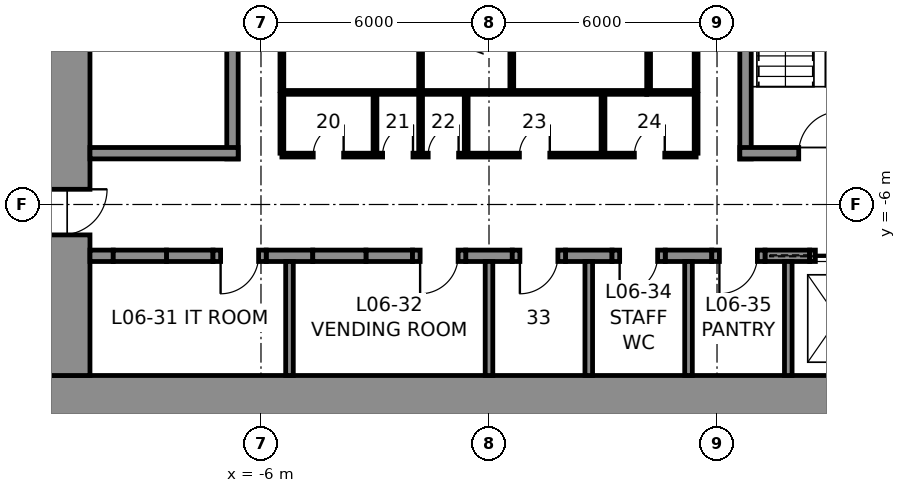
"""IFC4 building model, lengths in metres.
Left out: names, types, materials, properties, quantities, classifications, styles, units other than length and angle.
Written with IfcOpenShell. Run it as: python <this file> out.ifc"""

import sys

from ifc_helpers import new_model, si_unit, direction, frame, frame_2d, origin, place, context, subcontext, project, spatial, rectangle, extrude, element, fill, save


model = new_model("IFC4")
c1 = context("Model", 3, precision=1e-05, world=origin(), true_north=direction((0.0, 1.0)))
c2 = subcontext(c1, "Body", "Model", "MODEL_VIEW")
j1 = project(units=[si_unit("LENGTHUNIT", "METRE"), si_unit("PLANEANGLEUNIT", "RADIAN")], contexts=[c1])
p1 = place(None, origin())
s1 = spatial("IfcSite", under=j1, at=p1, CompositionType="ELEMENT")
p2 = place(p1, origin())
s2 = spatial("IfcBuilding", under=s1, at=p2, CompositionType="ELEMENT")
p3 = place(p2, frame((0.0, 0.0, 32.0)))
s3 = spatial("IfcBuildingStorey", under=s2, at=p3, CompositionType="ELEMENT", Elevation=32.0)
p4 = place(p3, frame((12.0, -11.25, 0.0), z_axis=(0.0, 0.0, 1.0), x_axis=(-1.0, 0.0, 0.0)))
e1 = element("IfcWall", 1, at=p4, inside=s3, PredefinedType="SHEAR", context=c2, shape_type="SweptSolid", body=[
    extrude(rectangle(XDim=24.0, YDim=1.5, at=frame_2d((12.0, 0.0))), origin(), (0.0, 0.0, 1.0), 5.5),
])
p5 = place(p3, frame((-11.25, -10.5, 0.0), z_axis=(0.0, 0.0, 1.0), x_axis=(0.0, 1.0, 0.0)))
e2 = element("IfcWall", 2, at=p5, inside=s3, PredefinedType="SHEAR", context=c2, shape_type="SweptSolid", body=[
    extrude(rectangle(XDim=21.0, YDim=1.5, at=frame_2d((10.5, 0.0))), origin(), (0.0, 0.0, 1.0), 5.5),
])
p6 = place(p5, frame((16.1, 0.0, 0.0)))
e3 = element("IfcOpeningElement", 3, at=p6, cuts=e2, PredefinedType="OPENING", context=c2, shape_type="SweptSolid", body=[
    extrude(rectangle(XDim=1.2, YDim=2.3, at=frame_2d((0.6, 1.15))), frame((0.0, 0.76, 0.0), z_axis=(0.0, -1.0, 0.0), x_axis=(1.0, 0.0, 0.0)), (0.0, 0.0, 1.0), 1.52),
])
p7 = place(p5, frame((3.7, 0.0, 0.0)))
e4 = element("IfcOpeningElement", 4, at=p7, cuts=e2, PredefinedType="OPENING", context=c2, shape_type="SweptSolid", body=[
    extrude(rectangle(XDim=1.2, YDim=2.3, at=frame_2d((0.6, 1.15))), frame((0.0, 0.76, 0.0), z_axis=(0.0, -1.0, 0.0), x_axis=(1.0, 0.0, 0.0)), (0.0, 0.0, 1.0), 1.52),
])
p8 = place(p3, frame((-10.5, -7.35, 0.0), z_axis=(0.0, 0.0, 1.0), x_axis=(1.0, 0.0, 0.0)))
e5 = element("IfcWall", 5, at=p8, inside=s3, PredefinedType="SHEAR", context=c2, shape_type="SweptSolid", body=[
    extrude(rectangle(XDim=0.613, YDim=0.3, at=frame_2d((0.306, 0.0))), origin(), (0.0, 0.0, 1.0), 5.5),
])
for number, where, z_axis, x_axis in (
    (6, (-8.488, -7.35, 0.0), (0.0, 0.0, 1.0), (1.0, 0.0, 0.0)),
    (7, (-5.863, -7.35, 0.0), (0.0, 0.0, 1.0), (1.0, 0.0, 0.0)),
    (8, (-3.238, -7.35, 0.0), (0.0, 0.0, 1.0), (1.0, 0.0, 0.0)),
    (9, (-0.613, -7.35, 0.0), (0.0, 0.0, 1.0), (1.0, 0.0, 0.0)),
    (10, (2.012, -7.35, 0.0), (0.0, 0.0, 1.0), (1.0, 0.0, 0.0)),
    (11, (4.637, -7.35, 0.0), (0.0, 0.0, 1.0), (1.0, 0.0, 0.0)),
):
    element("IfcWall", number, at=place(p3, frame(where, z_axis=z_axis, x_axis=x_axis)), inside=s3, PredefinedType="SHEAR", context=c2, shape_type="SweptSolid", body=[
        extrude(rectangle(XDim=1.225, YDim=0.3, at=frame_2d((0.613, 0.0))), origin(), (0.0, 0.0, 1.0), 5.5),
    ])
p9 = place(p3, frame((7.262, -7.35, 0.0), z_axis=(0.0, 0.0, 1.0), x_axis=(1.0, 0.0, 0.0)))
e12 = element("IfcWall", 12, at=p9, inside=s3, PredefinedType="SHEAR", context=c2, shape_type="SweptSolid", body=[
    extrude(rectangle(XDim=1.175, YDim=0.3, at=frame_2d((0.587, 0.0))), origin(), (0.0, 0.0, 1.0), 5.5),
])
p10 = place(p3, frame((-9.887, -7.35, 0.0), z_axis=(0.0, 0.0, 1.0), x_axis=(1.0, 0.0, 0.0)))
e13 = element("IfcWall", 13, at=p10, inside=s3, PredefinedType="PARTITIONING", context=c2, shape_type="SweptSolid", body=[
    extrude(rectangle(XDim=1.4, YDim=0.3, at=frame_2d((0.7, 0.0))), origin(), (0.0, 0.0, 1.0), 5.5),
])
p11 = place(p3, frame((-7.262, -7.35, 0.0), z_axis=(0.0, 0.0, 1.0), x_axis=(1.0, 0.0, 0.0)))
e14 = element("IfcWall", 14, at=p11, inside=s3, PredefinedType="PARTITIONING", context=c2, shape_type="SweptSolid", body=[
    extrude(rectangle(XDim=1.4, YDim=0.3, at=frame_2d((0.7, 0.0))), origin(), (0.0, 0.0, 1.0), 5.5),
])
p12 = place(p11, frame((0.2, 0.0, 0.0)))
e15 = element("IfcOpeningElement", 15, at=p12, cuts=e14, PredefinedType="OPENING", context=c2, shape_type="SweptSolid", body=[
    extrude(rectangle(XDim=1.0, YDim=2.3, at=frame_2d((0.5, 1.15))), frame((0.0, 0.16, 0.0), z_axis=(0.0, -1.0, 0.0), x_axis=(1.0, 0.0, 0.0)), (0.0, 0.0, 1.0), 0.32),
])
p13 = place(p3, frame((-4.637, -7.35, 0.0), z_axis=(0.0, 0.0, 1.0), x_axis=(1.0, 0.0, 0.0)))
e16 = element("IfcWall", 16, at=p13, inside=s3, PredefinedType="PARTITIONING", context=c2, shape_type="SweptSolid", body=[
    extrude(rectangle(XDim=1.4, YDim=0.3, at=frame_2d((0.7, 0.0))), origin(), (0.0, 0.0, 1.0), 5.5),
])
p14 = place(p3, frame((-2.012, -7.35, 0.0), z_axis=(0.0, 0.0, 1.0), x_axis=(1.0, 0.0, 0.0)))
e17 = element("IfcWall", 17, at=p14, inside=s3, PredefinedType="PARTITIONING", context=c2, shape_type="SweptSolid", body=[
    extrude(rectangle(XDim=1.4, YDim=0.3, at=frame_2d((0.7, 0.0))), origin(), (0.0, 0.0, 1.0), 5.5),
])
p15 = place(p14, frame((0.2, 0.0, 0.0)))
e18 = element("IfcOpeningElement", 18, at=p15, cuts=e17, PredefinedType="OPENING", context=c2, shape_type="SweptSolid", body=[
    extrude(rectangle(XDim=1.0, YDim=2.3, at=frame_2d((0.5, 1.15))), frame((0.0, 0.16, 0.0), z_axis=(0.0, -1.0, 0.0), x_axis=(1.0, 0.0, 0.0)), (0.0, 0.0, 1.0), 0.32),
])
p16 = place(p3, frame((0.613, -7.35, 0.0), z_axis=(0.0, 0.0, 1.0), x_axis=(1.0, 0.0, 0.0)))
e19 = element("IfcWall", 19, at=p16, inside=s3, PredefinedType="PARTITIONING", context=c2, shape_type="SweptSolid", body=[
    extrude(rectangle(XDim=1.4, YDim=0.3, at=frame_2d((0.7, 0.0))), origin(), (0.0, 0.0, 1.0), 5.5),
])
p17 = place(p16, frame((0.2, 0.0, 0.0)))
e20 = element("IfcOpeningElement", 20, at=p17, cuts=e19, PredefinedType="OPENING", context=c2, shape_type="SweptSolid", body=[
    extrude(rectangle(XDim=1.0, YDim=2.3, at=frame_2d((0.5, 1.15))), frame((0.0, 0.16, 0.0), z_axis=(0.0, -1.0, 0.0), x_axis=(1.0, 0.0, 0.0)), (0.0, 0.0, 1.0), 0.32),
])
p18 = place(p3, frame((3.238, -7.35, 0.0), z_axis=(0.0, 0.0, 1.0), x_axis=(1.0, 0.0, 0.0)))
e21 = element("IfcWall", 21, at=p18, inside=s3, PredefinedType="PARTITIONING", context=c2, shape_type="SweptSolid", body=[
    extrude(rectangle(XDim=1.4, YDim=0.3, at=frame_2d((0.7, 0.0))), origin(), (0.0, 0.0, 1.0), 5.5),
])
p19 = place(p18, frame((0.2, 0.0, 0.0)))
e22 = element("IfcOpeningElement", 22, at=p19, cuts=e21, PredefinedType="OPENING", context=c2, shape_type="SweptSolid", body=[
    extrude(rectangle(XDim=1.0, YDim=2.3, at=frame_2d((0.5, 1.15))), frame((0.0, 0.16, 0.0), z_axis=(0.0, -1.0, 0.0), x_axis=(1.0, 0.0, 0.0)), (0.0, 0.0, 1.0), 0.32),
])
p20 = place(p3, frame((5.863, -7.35, 0.0), z_axis=(0.0, 0.0, 1.0), x_axis=(1.0, 0.0, 0.0)))
e23 = element("IfcWall", 23, at=p20, inside=s3, PredefinedType="PARTITIONING", context=c2, shape_type="SweptSolid", body=[
    extrude(rectangle(XDim=1.4, YDim=0.3, at=frame_2d((0.7, 0.0))), origin(), (0.0, 0.0, 1.0), 5.5),
])
p21 = place(p20, frame((0.2, 0.0, 0.0)))
e24 = element("IfcOpeningElement", 24, at=p21, cuts=e23, PredefinedType="OPENING", context=c2, shape_type="SweptSolid", body=[
    extrude(rectangle(XDim=1.0, YDim=2.3, at=frame_2d((0.5, 1.15))), frame((0.0, 0.16, 0.0), z_axis=(0.0, -1.0, 0.0), x_axis=(1.0, 0.0, 0.0)), (0.0, 0.0, 1.0), 0.32),
])
p22 = place(p3, frame((8.438, -7.35, 0.0), z_axis=(0.0, 0.0, 1.0), x_axis=(1.0, 0.0, 0.0)))
e25 = element("IfcWall", 25, at=p22, inside=s3, PredefinedType="PARTITIONING", context=c2, shape_type="SweptSolid", body=[
    extrude(rectangle(XDim=1.5, YDim=0.3, at=frame_2d((0.75, 0.0))), origin(), (0.0, 0.0, 1.0), 5.5),
])
p23 = place(p22, frame((0.15, 0.0, 0.0)))
e26 = element("IfcOpeningElement", 26, at=p23, cuts=e25, PredefinedType="OPENING", context=c2, shape_type="SweptSolid", body=[
    extrude(rectangle(XDim=1.2, YDim=2.3, at=frame_2d((0.6, 1.15))), frame((0.0, 0.16, 0.0), z_axis=(0.0, -1.0, 0.0), x_axis=(1.0, 0.0, 0.0)), (0.0, 0.0, 1.0), 0.32),
])
for number, where, z_axis, x_axis in (
    (27, (-5.25, -10.5, 0.0), (0.0, 0.0, 1.0), (0.0, 1.0, 0.0)),
    (28, (0.0, -10.5, 0.0), (0.0, 0.0, 1.0), (0.0, 1.0, 0.0)),
    (29, (2.625, -10.5, 0.0), (0.0, 0.0, 1.0), (0.0, 1.0, 0.0)),
    (30, (5.25, -10.5, 0.0), (0.0, 0.0, 1.0), (0.0, 1.0, 0.0)),
    (31, (7.875, -10.5, 0.0), (0.0, 0.0, 1.0), (0.0, 1.0, 0.0)),
):
    element("IfcWall", number, at=place(p3, frame(where, z_axis=z_axis, x_axis=x_axis)), inside=s3, PredefinedType="PARTITIONING", context=c2, shape_type="SweptSolid", body=[
        extrude(rectangle(XDim=3.0, YDim=0.2, at=frame_2d((1.5, 0.0))), origin(), (0.0, 0.0, 1.0), 5.5),
    ])
p24 = place(p3, frame((-6.75, -4.8, 0.0), z_axis=(0.0, 0.0, 1.0), x_axis=(0.0, 1.0, 0.0)))
e32 = element("IfcWall", 32, at=p24, inside=s3, PredefinedType="SOLIDWALL", context=c2, shape_type="SweptSolid", body=[
    extrude(rectangle(XDim=9.6, YDim=0.3, at=frame_2d((4.8, 0.0))), origin(), (0.0, 0.0, 1.0), 5.25),
])
p25 = place(p3, frame((-6.6, -4.65, 0.0), z_axis=(0.0, 0.0, 1.0), x_axis=(-1.0, 0.0, 0.0)))
e33 = element("IfcWall", 33, at=p25, inside=s3, PredefinedType="SOLIDWALL", context=c2, shape_type="SweptSolid", body=[
    extrude(rectangle(XDim=3.9, YDim=0.3, at=frame_2d((1.95, 0.0))), origin(), (0.0, 0.0, 1.0), 5.25),
])
p26 = place(p3, frame((6.75, -4.8, 0.0), z_axis=(0.0, 0.0, 1.0), x_axis=(0.0, 1.0, 0.0)))
e34 = element("IfcWall", 34, at=p26, inside=s3, PredefinedType="SOLIDWALL", context=c2, shape_type="SweptSolid", body=[
    extrude(rectangle(XDim=9.6, YDim=0.3, at=frame_2d((4.8, 0.0))), origin(), (0.0, 0.0, 1.0), 5.25),
])
p27 = place(p3, frame((10.5, -4.65, 0.0), z_axis=(0.0, 0.0, 1.0), x_axis=(-1.0, 0.0, 0.0)))
e35 = element("IfcWall", 35, at=p27, inside=s3, PredefinedType="SOLIDWALL", context=c2, shape_type="SweptSolid", body=[
    extrude(rectangle(XDim=3.9, YDim=0.3, at=frame_2d((1.95, 0.0))), origin(), (0.0, 0.0, 1.0), 5.25),
])
p28 = place(p27, frame((1.25, 0.0, 0.0)))
e36 = element("IfcOpeningElement", 36, at=p28, cuts=e35, PredefinedType="OPENING", context=c2, shape_type="SweptSolid", body=[
    extrude(rectangle(XDim=1.1, YDim=2.3, at=frame_2d((0.55, 1.15))), frame((0.0, 0.16, 0.0), z_axis=(0.0, -1.0, 0.0), x_axis=(1.0, 0.0, 0.0)), (0.0, 0.0, 1.0), 0.32),
])
p29 = place(p3, frame((4.15, -3.05, 0.0), z_axis=(0.0, 0.0, 1.0), x_axis=(-1.0, 0.0, 0.0)))
e37 = element("IfcWall", 37, at=p29, inside=s3, PredefinedType="PARTITIONING", context=c2, shape_type="SweptSolid", body=[
    extrude(rectangle(XDim=9.6, YDim=0.1, at=frame_2d((4.8, 0.0))), origin(), (0.0, 0.0, 1.0), 5.25),
])
p30 = place(p3, frame((5.45, -3.05, 0.0), z_axis=(0.0, 0.0, 1.0), x_axis=(-1.0, 0.0, 0.0)))
e38 = element("IfcWall", 38, at=p30, inside=s3, PredefinedType="PARTITIONING", context=c2, shape_type="SweptSolid", body=[
    extrude(rectangle(XDim=1.3, YDim=0.1, at=frame_2d((0.65, 0.0))), origin(), (0.0, 0.0, 1.0), 5.25),
])
for number, where, z_axis, x_axis in (
    (39, (5.45, 3.0, 0.0), (0.0, 0.0, 1.0), (0.0, -1.0, 0.0)),
    (40, (-5.45, -3.0, 0.0), (0.0, 0.0, 1.0), (0.0, 1.0, 0.0)),
    (41, (-1.8, -3.0, 0.0), (0.0, 0.0, 1.0), (0.0, 1.0, 0.0)),
    (42, (0.6, -3.0, 0.0), (0.0, 0.0, 1.0), (0.0, 1.0, 0.0)),
    (43, (4.2, -3.0, 0.0), (0.0, 0.0, 1.0), (0.0, 1.0, 0.0)),
):
    element("IfcWall", number, at=place(p3, frame(where, z_axis=z_axis, x_axis=x_axis)), inside=s3, PredefinedType="PARTITIONING", context=c2, shape_type="SweptSolid", body=[
        extrude(rectangle(XDim=6.0, YDim=0.1, at=frame_2d((3.0, 0.0))), origin(), (0.0, 0.0, 1.0), 5.25),
    ])
p31 = place(p3, frame((5.45, -4.7, 0.0), z_axis=(0.0, 0.0, 1.0), x_axis=(-1.0, 0.0, 0.0)))
e44 = element("IfcWall", 44, at=p31, inside=s3, PredefinedType="PARTITIONING", context=c2, shape_type="SweptSolid", body=[
    extrude(rectangle(XDim=10.9, YDim=0.1, at=frame_2d((5.45, 0.0))), origin(), (0.0, 0.0, 1.0), 5.25),
])
p32 = place(p31, frame((9.275, 0.0, 0.0)))
e45 = element("IfcOpeningElement", 45, at=p32, cuts=e44, PredefinedType="OPENING", context=c2, shape_type="SweptSolid", body=[
    extrude(rectangle(XDim=0.8, YDim=2.3, at=frame_2d((0.4, 1.15))), frame((0.0, 0.06, 0.0), z_axis=(0.0, -1.0, 0.0), x_axis=(1.0, 0.0, 0.0)), (0.0, 0.0, 1.0), 0.12),
])
p33 = place(p31, frame((7.45, 0.0, 0.0)))
e46 = element("IfcOpeningElement", 46, at=p33, cuts=e44, PredefinedType="OPENING", context=c2, shape_type="SweptSolid", body=[
    extrude(rectangle(XDim=0.8, YDim=2.3, at=frame_2d((0.4, 1.15))), frame((0.0, 0.06, 0.0), z_axis=(0.0, -1.0, 0.0), x_axis=(1.0, 0.0, 0.0)), (0.0, 0.0, 1.0), 0.12),
])
p34 = place(p31, frame((6.25, 0.0, 0.0)))
e47 = element("IfcOpeningElement", 47, at=p34, cuts=e44, PredefinedType="OPENING", context=c2, shape_type="SweptSolid", body=[
    extrude(rectangle(XDim=0.8, YDim=2.3, at=frame_2d((0.4, 1.15))), frame((0.0, 0.06, 0.0), z_axis=(0.0, -1.0, 0.0), x_axis=(1.0, 0.0, 0.0)), (0.0, 0.0, 1.0), 0.12),
])
p35 = place(p31, frame((3.85, 0.0, 0.0)))
e48 = element("IfcOpeningElement", 48, at=p35, cuts=e44, PredefinedType="OPENING", context=c2, shape_type="SweptSolid", body=[
    extrude(rectangle(XDim=0.8, YDim=2.3, at=frame_2d((0.4, 1.15))), frame((0.0, 0.06, 0.0), z_axis=(0.0, -1.0, 0.0), x_axis=(1.0, 0.0, 0.0)), (0.0, 0.0, 1.0), 0.12),
])
p36 = place(p31, frame((0.825, 0.0, 0.0)))
e49 = element("IfcOpeningElement", 49, at=p36, cuts=e44, PredefinedType="OPENING", context=c2, shape_type="SweptSolid", body=[
    extrude(rectangle(XDim=0.8, YDim=2.3, at=frame_2d((0.4, 1.15))), frame((0.0, 0.06, 0.0), z_axis=(0.0, -1.0, 0.0), x_axis=(1.0, 0.0, 0.0)), (0.0, 0.0, 1.0), 0.12),
])
for number, where, z_axis, x_axis in (
    (50, (-5.45, -3.1, 0.0), (0.0, 0.0, 1.0), (0.0, -1.0, 0.0)),
    (51, (5.45, -3.1, 0.0), (0.0, 0.0, 1.0), (0.0, -1.0, 0.0)),
    (52, (-3.0, -3.1, 0.0), (0.0, 0.0, 1.0), (0.0, -1.0, 0.0)),
    (53, (-1.8, -3.1, 0.0), (0.0, 0.0, 1.0), (0.0, -1.0, 0.0)),
    (54, (-0.6, -3.1, 0.0), (0.0, 0.0, 1.0), (0.0, -1.0, 0.0)),
    (55, (3.0, -3.1, 0.0), (0.0, 0.0, 1.0), (0.0, -1.0, 0.0)),
):
    element("IfcWall", number, at=place(p3, frame(where, z_axis=z_axis, x_axis=x_axis)), inside=s3, PredefinedType="PARTITIONING", context=c2, shape_type="SweptSolid", body=[
        extrude(rectangle(XDim=1.55, YDim=0.1, at=frame_2d((0.775, 0.0))), origin(), (0.0, 0.0, 1.0), 5.25),
    ])
p37 = place(p28, frame((1.1, 0.0, 0.0), z_axis=(0.0, 0.0, 1.0), x_axis=(-1.0, 0.0, 0.0)))
e56 = element("IfcDoor", 56, at=p37, inside=s3, OperationType="SINGLE_SWING_RIGHT", PredefinedType="DOOR", context=c2, shape_type="SweptSolid", body=[
    extrude(rectangle(XDim=1.1, YDim=2.3, at=frame_2d((0.55, 1.15))), frame((0.0, 0.025, 0.0), z_axis=(0.0, -1.0, 0.0), x_axis=(1.0, 0.0, 0.0)), (0.0, 0.0, 1.0), 0.05),
])
fill(e36, e56)
p38 = place(p32, frame((0.8, 0.0, 0.0), z_axis=(0.0, 0.0, 1.0), x_axis=(-1.0, 0.0, 0.0)))
e57 = element("IfcDoor", 57, at=p38, inside=s3, OperationType="SINGLE_SWING_RIGHT", PredefinedType="DOOR", context=c2, shape_type="SweptSolid", body=[
    extrude(rectangle(XDim=0.8, YDim=2.3, at=frame_2d((0.4, 1.15))), frame((0.0, 0.025, 0.0), z_axis=(0.0, -1.0, 0.0), x_axis=(1.0, 0.0, 0.0)), (0.0, 0.0, 1.0), 0.05),
])
fill(e45, e57)
p39 = place(p33, frame((0.8, 0.0, 0.0), z_axis=(0.0, 0.0, 1.0), x_axis=(-1.0, 0.0, 0.0)))
e58 = element("IfcDoor", 58, at=p39, inside=s3, OperationType="SINGLE_SWING_RIGHT", PredefinedType="DOOR", context=c2, shape_type="SweptSolid", body=[
    extrude(rectangle(XDim=0.8, YDim=2.3, at=frame_2d((0.4, 1.15))), frame((0.0, 0.025, 0.0), z_axis=(0.0, -1.0, 0.0), x_axis=(1.0, 0.0, 0.0)), (0.0, 0.0, 1.0), 0.05),
])
fill(e46, e58)
p40 = place(p34, frame((0.8, 0.0, 0.0), z_axis=(0.0, 0.0, 1.0), x_axis=(-1.0, 0.0, 0.0)))
e59 = element("IfcDoor", 59, at=p40, inside=s3, OperationType="SINGLE_SWING_RIGHT", PredefinedType="DOOR", context=c2, shape_type="SweptSolid", body=[
    extrude(rectangle(XDim=0.8, YDim=2.3, at=frame_2d((0.4, 1.15))), frame((0.0, 0.025, 0.0), z_axis=(0.0, -1.0, 0.0), x_axis=(1.0, 0.0, 0.0)), (0.0, 0.0, 1.0), 0.05),
])
fill(e47, e59)
p41 = place(p35, frame((0.8, 0.0, 0.0), z_axis=(0.0, 0.0, 1.0), x_axis=(-1.0, 0.0, 0.0)))
e60 = element("IfcDoor", 60, at=p41, inside=s3, OperationType="SINGLE_SWING_RIGHT", PredefinedType="DOOR", context=c2, shape_type="SweptSolid", body=[
    extrude(rectangle(XDim=0.8, YDim=2.3, at=frame_2d((0.4, 1.15))), frame((0.0, 0.025, 0.0), z_axis=(0.0, -1.0, 0.0), x_axis=(1.0, 0.0, 0.0)), (0.0, 0.0, 1.0), 0.05),
])
fill(e48, e60)
p42 = place(p36, frame((0.8, 0.0, 0.0), z_axis=(0.0, 0.0, 1.0), x_axis=(-1.0, 0.0, 0.0)))
e61 = element("IfcDoor", 61, at=p42, inside=s3, OperationType="SINGLE_SWING_RIGHT", PredefinedType="DOOR", context=c2, shape_type="SweptSolid", body=[
    extrude(rectangle(XDim=0.8, YDim=2.3, at=frame_2d((0.4, 1.15))), frame((0.0, 0.025, 0.0), z_axis=(0.0, -1.0, 0.0), x_axis=(1.0, 0.0, 0.0)), (0.0, 0.0, 1.0), 0.05),
])
fill(e49, e61)
p43 = place(p12, frame((1.0, 0.0, 0.0), z_axis=(0.0, 0.0, 1.0), x_axis=(-1.0, 0.0, 0.0)))
e62 = element("IfcDoor", 62, at=p43, inside=s3, OperationType="SINGLE_SWING_RIGHT", PredefinedType="DOOR", context=c2, shape_type="SweptSolid", body=[
    extrude(rectangle(XDim=1.0, YDim=2.3, at=frame_2d((0.5, 1.15))), frame((0.0, 0.025, 0.0), z_axis=(0.0, -1.0, 0.0), x_axis=(1.0, 0.0, 0.0)), (0.0, 0.0, 1.0), 0.05),
])
fill(e15, e62)
p44 = place(p15, frame((1.0, 0.0, 0.0), z_axis=(0.0, 0.0, 1.0), x_axis=(-1.0, 0.0, 0.0)))
e63 = element("IfcDoor", 63, at=p44, inside=s3, OperationType="SINGLE_SWING_RIGHT", PredefinedType="DOOR", context=c2, shape_type="SweptSolid", body=[
    extrude(rectangle(XDim=1.0, YDim=2.3, at=frame_2d((0.5, 1.15))), frame((0.0, 0.025, 0.0), z_axis=(0.0, -1.0, 0.0), x_axis=(1.0, 0.0, 0.0)), (0.0, 0.0, 1.0), 0.05),
])
fill(e18, e63)
p45 = place(p17, frame((1.0, 0.0, 0.0), z_axis=(0.0, 0.0, 1.0), x_axis=(-1.0, 0.0, 0.0)))
e64 = element("IfcDoor", 64, at=p45, inside=s3, OperationType="SINGLE_SWING_RIGHT", PredefinedType="DOOR", context=c2, shape_type="SweptSolid", body=[
    extrude(rectangle(XDim=1.0, YDim=2.3, at=frame_2d((0.5, 1.15))), frame((0.0, 0.025, 0.0), z_axis=(0.0, -1.0, 0.0), x_axis=(1.0, 0.0, 0.0)), (0.0, 0.0, 1.0), 0.05),
])
fill(e20, e64)
p46 = place(p19, frame((1.0, 0.0, 0.0), z_axis=(0.0, 0.0, 1.0), x_axis=(-1.0, 0.0, 0.0)))
e65 = element("IfcDoor", 65, at=p46, inside=s3, OperationType="SINGLE_SWING_RIGHT", PredefinedType="DOOR", context=c2, shape_type="SweptSolid", body=[
    extrude(rectangle(XDim=1.0, YDim=2.3, at=frame_2d((0.5, 1.15))), frame((0.0, 0.025, 0.0), z_axis=(0.0, -1.0, 0.0), x_axis=(1.0, 0.0, 0.0)), (0.0, 0.0, 1.0), 0.05),
])
fill(e22, e65)
p47 = place(p21, frame((1.0, 0.0, 0.0), z_axis=(0.0, 0.0, 1.0), x_axis=(-1.0, 0.0, 0.0)))
e66 = element("IfcDoor", 66, at=p47, inside=s3, OperationType="SINGLE_SWING_RIGHT", PredefinedType="DOOR", context=c2, shape_type="SweptSolid", body=[
    extrude(rectangle(XDim=1.0, YDim=2.3, at=frame_2d((0.5, 1.15))), frame((0.0, 0.025, 0.0), z_axis=(0.0, -1.0, 0.0), x_axis=(1.0, 0.0, 0.0)), (0.0, 0.0, 1.0), 0.05),
])
fill(e24, e66)
p48 = place(p7, frame((1.2, 0.0, 0.0), z_axis=(0.0, 0.0, 1.0), x_axis=(-1.0, 0.0, 0.0)))
e67 = element("IfcDoor", 67, at=p48, inside=s3, OperationType="SINGLE_SWING_LEFT", PredefinedType="DOOR", context=c2, shape_type="SweptSolid", body=[
    extrude(rectangle(XDim=1.2, YDim=2.3, at=frame_2d((0.6, 1.15))), frame((0.0, 0.025, 0.0), z_axis=(0.0, -1.0, 0.0), x_axis=(1.0, 0.0, 0.0)), (0.0, 0.0, 1.0), 0.05),
])
fill(e4, e67)
p49 = place(p23, origin())
e68 = element("IfcDoor", 68, at=p49, inside=s3, OperationType="SLIDING_TO_LEFT", PredefinedType="DOOR", context=c2, shape_type="SweptSolid", body=[
    extrude(rectangle(XDim=1.2, YDim=2.3, at=frame_2d((0.6, 1.15))), frame((0.0, 0.025, 0.0), z_axis=(0.0, -1.0, 0.0), x_axis=(1.0, 0.0, 0.0)), (0.0, 0.0, 1.0), 0.05),
])
fill(e26, e68)
save(model, sys.argv[1])
